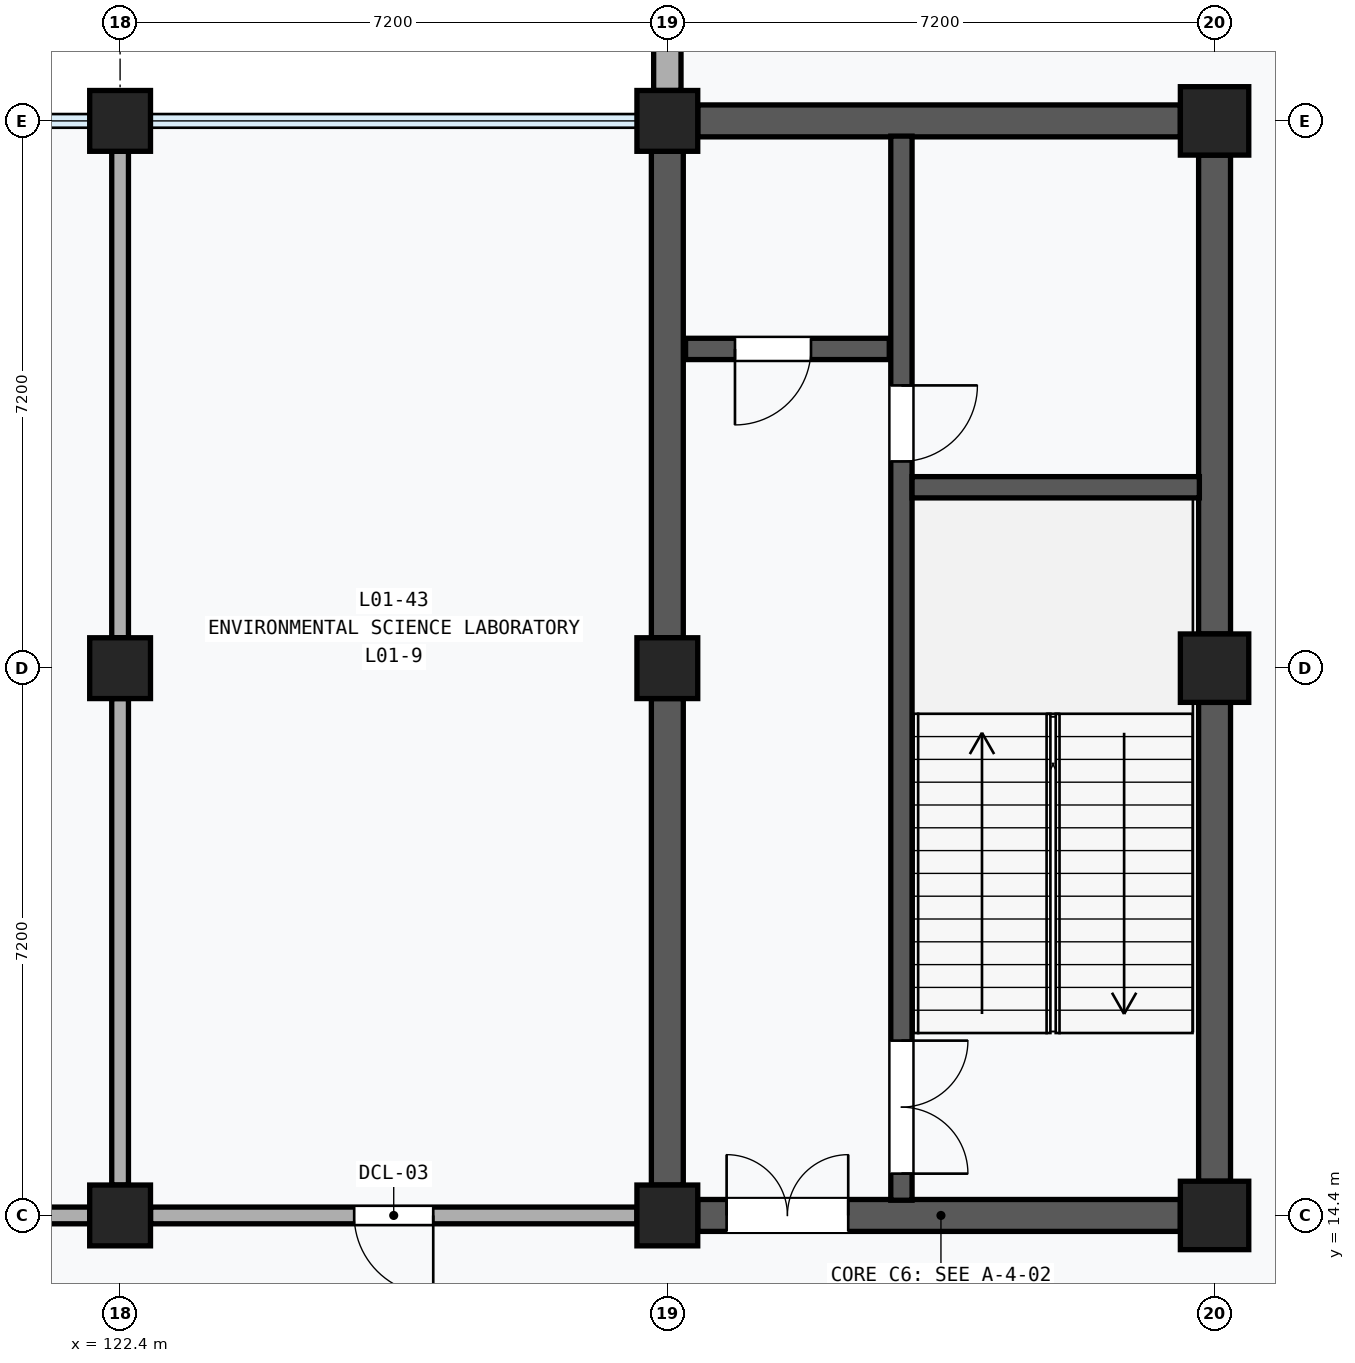
"""IFC4 building model, lengths in metres.
Left out: names, types, materials, properties, quantities, classifications, styles, units other than length and angle.
Written with IfcOpenShell. Run it as: python <this file> out.ifc"""

import sys

from ifc_helpers import new_model, si_unit, direction, frame, frame_2d, origin, origin_2d, place, context, subcontext, project, spatial, rectangle, extrude, element, fill, save


model = new_model("IFC4")
c1 = context("Model", 3, precision=1e-05, world=origin(), true_north=direction((0.0, 1.0)))
c2 = subcontext(c1, "Body", "Model", "MODEL_VIEW")
j1 = project(units=[si_unit("LENGTHUNIT", "METRE"), si_unit("PLANEANGLEUNIT", "RADIAN")], contexts=[c1])
p1 = place(None, origin())
s1 = spatial("IfcSite", under=j1, at=p1, CompositionType="ELEMENT")
p2 = place(p1, origin())
s2 = spatial("IfcBuilding", under=s1, at=p2, CompositionType="ELEMENT")
p3 = place(p2, frame((0.0, 0.0, 4.8)))
s3 = spatial("IfcBuildingStorey", under=s2, at=p3, CompositionType="ELEMENT", Elevation=4.8)
for number, where, z_axis, x_axis in (
    (1, (122.4, 14.4, 0.0), (0.0, 0.0, 1.0), (1.0, 0.0, 0.0)),
    (2, (122.4, 21.6, 0.0), (0.0, 0.0, 1.0), (1.0, 0.0, 0.0)),
    (3, (122.4, 28.8, 0.0), (0.0, 0.0, 1.0), (1.0, 0.0, 0.0)),
    (4, (129.6, 14.4, 0.0), (0.0, 0.0, 1.0), (1.0, 0.0, 0.0)),
    (5, (129.6, 21.6, 0.0), (0.0, 0.0, 1.0), (1.0, 0.0, 0.0)),
    (6, (129.6, 28.8, 0.0), (0.0, 0.0, 1.0), (1.0, 0.0, 0.0)),
):
    element("IfcColumn", number, at=place(p3, frame(where, z_axis=z_axis, x_axis=x_axis)), inside=s3, PredefinedType="COLUMN", context=c2, shape_type="SweptSolid", body=[
        extrude(rectangle(XDim=0.8, YDim=0.8, at=origin_2d()), origin(), (0.0, 0.0, 1.0), 4.8),
    ])
for number, where, z_axis, x_axis in (
    (7, (136.8, 14.4, 0.0), (0.0, 0.0, 1.0), (1.0, 0.0, 0.0)),
    (8, (136.8, 21.6, 0.0), (0.0, 0.0, 1.0), (1.0, 0.0, 0.0)),
    (9, (136.8, 28.8, 0.0), (0.0, 0.0, 1.0), (1.0, 0.0, 0.0)),
):
    element("IfcColumn", number, at=place(p3, frame(where, z_axis=z_axis, x_axis=x_axis)), inside=s3, PredefinedType="COLUMN", context=c2, shape_type="SweptSolid", body=[
        extrude(rectangle(XDim=0.9, YDim=0.9, at=origin_2d()), origin(), (0.0, 0.0, 1.0), 4.8),
    ])
p4 = place(p3, frame((129.6, 29.2, 0.0), z_axis=(0.0, 0.0, 1.0), x_axis=(0.0, 1.0, 0.0)))
e10 = element("IfcWall", 10, at=p4, inside=s3, PredefinedType="SOLIDWALL", context=c2, shape_type="SweptSolid", body=[
    extrude(rectangle(XDim=6.4, YDim=0.36, at=frame_2d((3.2, 0.0))), origin(), (0.0, 0.0, 1.0), 3.85),
])
p5 = place(p4, frame((2.1, 0.0, 0.9)))
e11 = element("IfcOpeningElement", 11, at=p5, cuts=e10, PredefinedType="OPENING", context=c2, shape_type="SweptSolid", body=[
    extrude(rectangle(XDim=2.2, YDim=1.8, at=frame_2d((1.1, 0.9))), frame((0.0, 0.192, 0.0), z_axis=(0.0, -1.0, 0.0), x_axis=(1.0, 0.0, 0.0)), (0.0, 0.0, 1.0), 0.384),
])
for number, where, z_axis, x_axis in (
    (12, (129.6, 14.8, 0.0), (0.0, 0.0, 1.0), (0.0, 1.0, 0.0)),
    (13, (129.6, 22.0, 0.0), (0.0, 0.0, 1.0), (0.0, 1.0, 0.0)),
):
    element("IfcWall", number, at=place(p3, frame(where, z_axis=z_axis, x_axis=x_axis)), inside=s3, PredefinedType="SHEAR", context=c2, shape_type="SweptSolid", body=[
        extrude(rectangle(XDim=6.4, YDim=0.42, at=frame_2d((3.2, 0.0))), origin(), (0.0, 0.0, 1.0), 3.58),
    ])
p6 = place(p3, frame((136.8, 14.85, 0.0), z_axis=(0.0, 0.0, 1.0), x_axis=(0.0, 1.0, 0.0)))
e14 = element("IfcWall", 14, at=p6, inside=s3, PredefinedType="SHEAR", context=c2, shape_type="SweptSolid", body=[
    extrude(rectangle(XDim=6.3, YDim=0.42, at=frame_2d((3.15, 0.0))), origin(), (0.0, 0.0, 1.0), 3.58),
])
p7 = place(p3, frame((136.8, 22.05, 0.0), z_axis=(0.0, 0.0, 1.0), x_axis=(0.0, 1.0, 0.0)))
e15 = element("IfcWall", 15, at=p7, inside=s3, PredefinedType="SHEAR", context=c2, shape_type="SweptSolid", body=[
    extrude(rectangle(XDim=6.3, YDim=0.42, at=frame_2d((3.15, 0.0))), origin(), (0.0, 0.0, 1.0), 3.58),
])
p8 = place(p3, frame((130.0, 14.4, 0.0), z_axis=(0.0, 0.0, 1.0), x_axis=(1.0, 0.0, 0.0)))
e16 = element("IfcWall", 16, at=p8, inside=s3, PredefinedType="SHEAR", context=c2, shape_type="SweptSolid", body=[
    extrude(rectangle(XDim=6.35, YDim=0.42, at=frame_2d((3.175, 0.0))), origin(), (0.0, 0.0, 1.0), 3.58),
])
p9 = place(p8, frame((0.38, 0.0, 0.0)))
e17 = element("IfcOpeningElement", 17, at=p9, cuts=e16, PredefinedType="OPENING", context=c2, shape_type="SweptSolid", body=[
    extrude(rectangle(XDim=1.6, YDim=2.2, at=frame_2d((0.8, 1.1))), frame((0.0, 0.222, 0.0), z_axis=(0.0, -1.0, 0.0), x_axis=(1.0, 0.0, 0.0)), (0.0, 0.0, 1.0), 0.444),
])
p10 = place(p3, frame((130.0, 28.8, 0.0), z_axis=(0.0, 0.0, 1.0), x_axis=(1.0, 0.0, 0.0)))
e18 = element("IfcWall", 18, at=p10, inside=s3, PredefinedType="SHEAR", context=c2, shape_type="SweptSolid", body=[
    extrude(rectangle(XDim=6.35, YDim=0.42, at=frame_2d((3.175, 0.0))), origin(), (0.0, 0.0, 1.0), 3.58),
])
p11 = place(p3, frame((132.68, 14.6, 0.0), z_axis=(0.0, 0.0, 1.0), x_axis=(0.0, 1.0, 0.0)))
e19 = element("IfcWall", 19, at=p11, inside=s3, PredefinedType="SHEAR", context=c2, shape_type="SweptSolid", body=[
    extrude(rectangle(XDim=14.0, YDim=0.28, at=frame_2d((7.0, 0.0))), origin(), (0.0, 0.0, 1.0), 4.48),
])
p12 = place(p11, frame((0.35, 0.0, 0.0)))
e20 = element("IfcOpeningElement", 20, at=p12, cuts=e19, PredefinedType="OPENING", context=c2, shape_type="SweptSolid", body=[
    extrude(rectangle(XDim=1.75, YDim=2.15, at=frame_2d((0.875, 1.075))), frame((0.0, 0.152, 0.0), z_axis=(0.0, -1.0, 0.0), x_axis=(1.0, 0.0, 0.0)), (0.0, 0.0, 1.0), 0.304),
])
p13 = place(p11, frame((9.72, 0.0, 0.0)))
e21 = element("IfcOpeningElement", 21, at=p13, cuts=e19, PredefinedType="OPENING", context=c2, shape_type="SweptSolid", body=[
    extrude(rectangle(XDim=1.0, YDim=2.15, at=frame_2d((0.5, 1.075))), frame((0.0, 0.152, 0.0), z_axis=(0.0, -1.0, 0.0), x_axis=(1.0, 0.0, 0.0)), (0.0, 0.0, 1.0), 0.304),
])
p14 = place(p3, frame((132.82, 23.98, 0.0), z_axis=(0.0, 0.0, 1.0), x_axis=(1.0, 0.0, 0.0)))
e22 = element("IfcWall", 22, at=p14, inside=s3, PredefinedType="SHEAR", context=c2, shape_type="SweptSolid", body=[
    extrude(rectangle(XDim=3.78, YDim=0.28, at=frame_2d((1.89, 0.0))), origin(), (0.0, 0.0, 1.0), 4.48),
])
p15 = place(p3, frame((129.84, 25.8, 0.0), z_axis=(0.0, 0.0, 1.0), x_axis=(1.0, 0.0, 0.0)))
e23 = element("IfcWall", 23, at=p15, inside=s3, PredefinedType="SHEAR", context=c2, shape_type="SweptSolid", body=[
    extrude(rectangle(XDim=2.68, YDim=0.28, at=frame_2d((1.34, 0.0))), origin(), (0.0, 0.0, 1.0), 4.48),
])
p16 = place(p15, frame((0.65, 0.0, 0.0)))
e24 = element("IfcOpeningElement", 24, at=p16, cuts=e23, PredefinedType="OPENING", context=c2, shape_type="SweptSolid", body=[
    extrude(rectangle(XDim=1.0, YDim=2.15, at=frame_2d((0.5, 1.075))), frame((0.0, 0.152, 0.0), z_axis=(0.0, -1.0, 0.0), x_axis=(1.0, 0.0, 0.0)), (0.0, 0.0, 1.0), 0.304),
])
p17 = place(p3, frame((115.6, 14.4, 0.0), z_axis=(0.0, 0.0, 1.0), x_axis=(1.0, 0.0, 0.0)))
e25 = element("IfcWall", 25, at=p17, inside=s3, PredefinedType="PARTITIONING", context=c2, shape_type="SweptSolid", body=[
    extrude(rectangle(XDim=6.4, YDim=0.22, at=frame_2d((3.2, 0.0))), origin(), (0.0, 0.0, 1.0), 3.58),
])
p18 = place(p17, frame((2.69, 0.0, 0.0)))
e26 = element("IfcOpeningElement", 26, at=p18, cuts=e25, PredefinedType="OPENING", context=c2, shape_type="SweptSolid", body=[
    extrude(rectangle(XDim=1.02, YDim=2.12, at=frame_2d((0.51, 1.06))), frame((0.0, 0.122, 0.0), z_axis=(0.0, -1.0, 0.0), x_axis=(1.0, 0.0, 0.0)), (0.0, 0.0, 1.0), 0.244),
])
for number, where, z_axis, x_axis in (
    (27, (122.4, 14.8, 0.0), (0.0, 0.0, 1.0), (0.0, 1.0, 0.0)),
    (28, (122.4, 22.0, 0.0), (0.0, 0.0, 1.0), (0.0, 1.0, 0.0)),
):
    element("IfcWall", number, at=place(p3, frame(where, z_axis=z_axis, x_axis=x_axis)), inside=s3, PredefinedType="PARTITIONING", context=c2, shape_type="SweptSolid", body=[
        extrude(rectangle(XDim=6.4, YDim=0.22, at=frame_2d((3.2, 0.0))), origin(), (0.0, 0.0, 1.0), 3.58),
    ])
p19 = place(p3, frame((122.8, 14.4, 0.0), z_axis=(0.0, 0.0, 1.0), x_axis=(1.0, 0.0, 0.0)))
e29 = element("IfcWall", 29, at=p19, inside=s3, PredefinedType="PARTITIONING", context=c2, shape_type="SweptSolid", body=[
    extrude(rectangle(XDim=6.4, YDim=0.22, at=frame_2d((3.2, 0.0))), origin(), (0.0, 0.0, 1.0), 3.58),
])
p20 = place(p19, frame((2.68, 0.0, 0.0)))
e30 = element("IfcOpeningElement", 30, at=p20, cuts=e29, PredefinedType="OPENING", context=c2, shape_type="SweptSolid", body=[
    extrude(rectangle(XDim=1.04, YDim=2.14, at=frame_2d((0.52, 1.07))), frame((0.0, 0.122, 0.0), z_axis=(0.0, -1.0, 0.0), x_axis=(1.0, 0.0, 0.0)), (0.0, 0.0, 1.0), 0.244),
])
p21 = place(p9, origin())
e31 = element("IfcDoor", 31, at=p21, inside=s3, OperationType="DOUBLE_DOOR_SINGLE_SWING", PredefinedType="DOOR", context=c2, shape_type="SweptSolid", body=[
    extrude(rectangle(XDim=1.6, YDim=2.2, at=frame_2d((0.8, 1.1))), frame((0.0, 0.025, 0.0), z_axis=(0.0, -1.0, 0.0), x_axis=(1.0, 0.0, 0.0)), (0.0, 0.0, 1.0), 0.05),
])
fill(e17, e31)
p22 = place(p12, frame((1.75, 0.0, 0.0), z_axis=(0.0, 0.0, 1.0), x_axis=(-1.0, 0.0, 0.0)))
e32 = element("IfcDoor", 32, at=p22, inside=s3, OperationType="DOUBLE_DOOR_SINGLE_SWING", PredefinedType="DOOR", context=c2, shape_type="SweptSolid", body=[
    extrude(rectangle(XDim=1.75, YDim=2.15, at=frame_2d((0.875, 1.075))), frame((0.0, 0.025, 0.0), z_axis=(0.0, -1.0, 0.0), x_axis=(1.0, 0.0, 0.0)), (0.0, 0.0, 1.0), 0.05),
])
fill(e20, e32)
p23 = place(p13, frame((1.0, 0.0, 0.0), z_axis=(0.0, 0.0, 1.0), x_axis=(-1.0, 0.0, 0.0)))
e33 = element("IfcDoor", 33, at=p23, inside=s3, OperationType="SINGLE_SWING_LEFT", PredefinedType="DOOR", context=c2, shape_type="SweptSolid", body=[
    extrude(rectangle(XDim=1.0, YDim=2.15, at=frame_2d((0.5, 1.075))), frame((0.0, 0.025, 0.0), z_axis=(0.0, -1.0, 0.0), x_axis=(1.0, 0.0, 0.0)), (0.0, 0.0, 1.0), 0.05),
])
fill(e21, e33)
p24 = place(p16, frame((1.0, 0.0, 0.0), z_axis=(0.0, 0.0, 1.0), x_axis=(-1.0, 0.0, 0.0)))
e34 = element("IfcDoor", 34, at=p24, inside=s3, OperationType="SINGLE_SWING_RIGHT", PredefinedType="DOOR", context=c2, shape_type="SweptSolid", body=[
    extrude(rectangle(XDim=1.0, YDim=2.15, at=frame_2d((0.5, 1.075))), frame((0.0, 0.025, 0.0), z_axis=(0.0, -1.0, 0.0), x_axis=(1.0, 0.0, 0.0)), (0.0, 0.0, 1.0), 0.05),
])
fill(e24, e34)
p25 = place(p20, frame((1.04, 0.0, 0.0), z_axis=(0.0, 0.0, 1.0), x_axis=(-1.0, 0.0, 0.0)))
e35 = element("IfcDoor", 35, at=p25, inside=s3, OperationType="SINGLE_SWING_LEFT", PredefinedType="DOOR", context=c2, shape_type="SweptSolid", body=[
    extrude(rectangle(XDim=1.04, YDim=2.14, at=frame_2d((0.52, 1.07))), frame((0.0, 0.025, 0.0), z_axis=(0.0, -1.0, 0.0), x_axis=(1.0, 0.0, 0.0)), (0.0, 0.0, 1.0), 0.05),
])
fill(e30, e35)
save(model, sys.argv[1])
